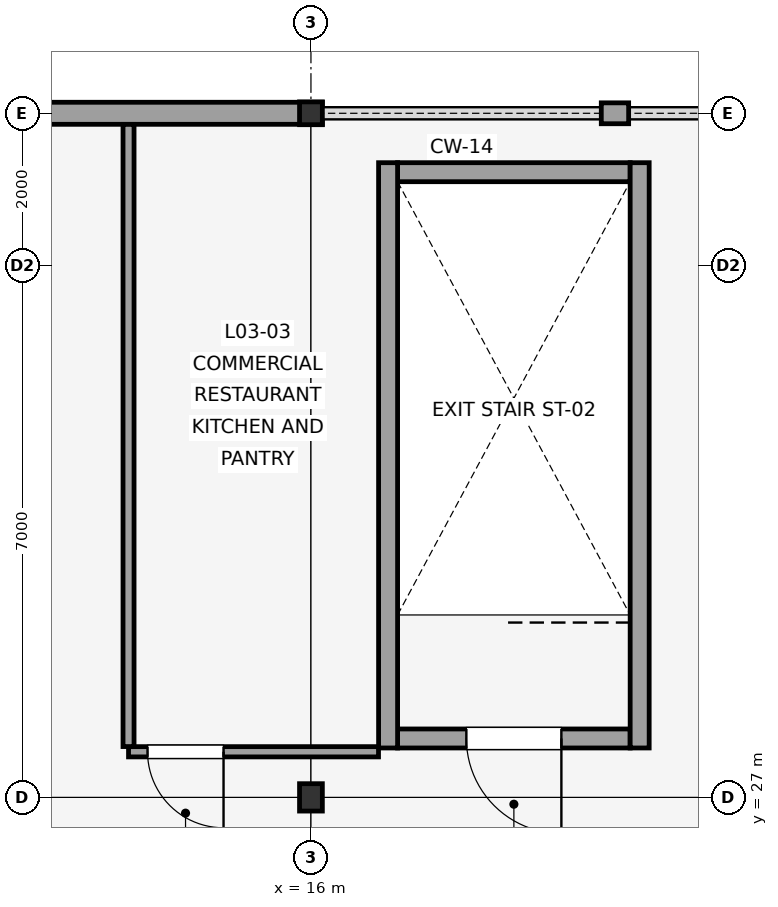
"""IFC4 building model, lengths in metres.
Left out: names, types, materials, properties, quantities, classifications, styles, units other than length and angle.
Written with IfcOpenShell. Run it as: python <this file> out.ifc"""

import sys

from ifc_helpers import new_model, si_unit, direction, frame, frame_2d, origin, origin_2d, place, context, subcontext, project, spatial, rectangle, i_section, extrude, element, fill, save


model = new_model("IFC4")
c1 = context("Model", 3, precision=1e-05, world=origin(), true_north=direction((0.0, 1.0)))
c2 = subcontext(c1, "Body", "Model", "MODEL_VIEW")
j1 = project(units=[si_unit("LENGTHUNIT", "METRE"), si_unit("PLANEANGLEUNIT", "RADIAN")], contexts=[c1])
p1 = place(None, origin())
s1 = spatial("IfcSite", under=j1, at=p1, CompositionType="ELEMENT")
p2 = place(p1, origin())
s2 = spatial("IfcBuilding", under=s1, at=p2, CompositionType="ELEMENT")
p3 = place(p2, frame((0.0, 0.0, 13.8)))
s3 = spatial("IfcBuildingStorey", under=s2, at=p3, CompositionType="ELEMENT", Elevation=13.8)
p4 = place(p3, frame((16.0, 27.0, 0.0), z_axis=(0.0, 0.0, 1.0), x_axis=(1.0, 0.0, 0.0)))
e1 = element("IfcColumn", 1, at=p4, inside=s3, PredefinedType="COLUMN", context=c2, shape_type="SweptSolid", body=[
    extrude(i_section(OverallWidth=0.3, OverallDepth=0.36, WebThickness=0.01, FlangeThickness=0.018, FilletRadius=0.027, at=origin_2d()), origin(), (0.0, 0.0, 1.0), 4.5),
])
p5 = place(p3, frame((16.0, 36.0, 0.0), z_axis=(0.0, 0.0, 1.0), x_axis=(1.0, 0.0, 0.0)))
e2 = element("IfcColumn", 2, at=p5, inside=s3, PredefinedType="COLUMN", context=c2, shape_type="SweptSolid", body=[
    extrude(i_section(OverallWidth=0.3, OverallDepth=0.3, WebThickness=0.009, FlangeThickness=0.014, FilletRadius=0.027, at=origin_2d()), origin(), (0.0, 0.0, 1.0), 4.5),
])
p6 = place(p3, frame((16.15, 36.0, 0.0), z_axis=(0.0, 0.0, 1.0), x_axis=(-1.0, 0.0, 0.0)))
e3 = element("IfcWall", 3, at=p6, inside=s3, PredefinedType="SOLIDWALL", context=c2, shape_type="SweptSolid", body=[
    extrude(rectangle(XDim=8.3, YDim=0.29, at=frame_2d((4.15, 0.0))), origin(), (0.0, 0.0, 1.0), 2.55),
])
p7 = place(p3, frame((20.18, 36.0, 0.0), z_axis=(0.0, 0.0, 1.0), x_axis=(-1.0, 0.0, 0.0)))
e4 = element("IfcWall", 4, at=p7, inside=s3, PredefinedType="SOLIDWALL", context=c2, shape_type="SweptSolid", body=[
    extrude(rectangle(XDim=0.36, YDim=0.275, at=frame_2d((0.18, 0.0))), origin(), (0.0, 0.0, 1.0), 2.55),
])
p8 = place(p3, frame((20.2, 27.775, 0.0), z_axis=(0.0, 0.0, 1.0), x_axis=(-1.0, 0.0, 0.0)))
e5 = element("IfcWall", 5, at=p8, inside=s3, PredefinedType="SHEAR", context=c2, shape_type="SweptSolid", body=[
    extrude(rectangle(XDim=3.06, YDim=0.25, at=frame_2d((1.53, 0.0))), origin(), (0.0, 0.0, 1.0), 4.5),
])
p9 = place(p8, frame((0.905, 0.0, 0.0)))
e6 = element("IfcOpeningElement", 6, at=p9, cuts=e5, PredefinedType="OPENING", context=c2, shape_type="SweptSolid", body=[
    extrude(rectangle(XDim=1.25, YDim=2.15, at=frame_2d((0.625, 1.075))), frame((0.0, 0.135, 0.0), z_axis=(0.0, -1.0, 0.0), x_axis=(1.0, 0.0, 0.0)), (0.0, 0.0, 1.0), 0.27),
])
p10 = place(p3, frame((20.2, 35.225, 0.0), z_axis=(0.0, 0.0, 1.0), x_axis=(-1.0, 0.0, 0.0)))
e7 = element("IfcWall", 7, at=p10, inside=s3, PredefinedType="SHEAR", context=c2, shape_type="SweptSolid", body=[
    extrude(rectangle(XDim=3.06, YDim=0.25, at=frame_2d((1.53, 0.0))), origin(), (0.0, 0.0, 1.0), 4.5),
])
for number, where, z_axis, x_axis in (
    (8, (20.325, 27.65, 0.0), (0.0, 0.0, 1.0), (0.0, 1.0, 0.0)),
    (9, (17.015, 27.65, 0.0), (0.0, 0.0, 1.0), (0.0, 1.0, 0.0)),
):
    element("IfcWall", number, at=place(p3, frame(where, z_axis=z_axis, x_axis=x_axis)), inside=s3, PredefinedType="SHEAR", context=c2, shape_type="SweptSolid", body=[
        extrude(rectangle(XDim=7.7, YDim=0.25, at=frame_2d((3.85, 0.0))), origin(), (0.0, 0.0, 1.0), 4.5),
    ])
p11 = place(p3, frame((16.889, 27.6, 0.0), z_axis=(0.0, 0.0, 1.0), x_axis=(-1.0, 0.0, 0.0)))
e10 = element("IfcWall", 10, at=p11, inside=s3, PredefinedType="PARTITIONING", context=c2, shape_type="SweptSolid", body=[
    extrude(rectangle(XDim=3.289, YDim=0.135, at=frame_2d((1.645, 0.0))), origin(), (0.0, 0.0, 1.0), 2.7),
])
p12 = place(p11, frame((2.039, 0.0, 0.0)))
e11 = element("IfcOpeningElement", 11, at=p12, cuts=e10, PredefinedType="OPENING", context=c2, shape_type="SweptSolid", body=[
    extrude(rectangle(XDim=1.0, YDim=2.15, at=frame_2d((0.5, 1.075))), frame((0.0, 0.077, 0.0), z_axis=(0.0, -1.0, 0.0), x_axis=(1.0, 0.0, 0.0)), (0.0, 0.0, 1.0), 0.155),
])
p13 = place(p3, frame((13.6, 27.668, 0.0), z_axis=(0.0, 0.0, 1.0), x_axis=(0.0, 1.0, 0.0)))
e12 = element("IfcWall", 12, at=p13, inside=s3, PredefinedType="PARTITIONING", context=c2, shape_type="SweptSolid", body=[
    extrude(rectangle(XDim=8.186, YDim=0.145, at=frame_2d((4.093, 0.0))), origin(), (0.0, 0.0, 1.0), 2.7),
])
p14 = place(p9, origin())
e13 = element("IfcDoor", 13, at=p14, inside=s3, OperationType="SINGLE_SWING_LEFT", PredefinedType="DOOR", context=c2, shape_type="SweptSolid", body=[
    extrude(rectangle(XDim=1.25, YDim=2.15, at=frame_2d((0.625, 1.075))), frame((0.0, 0.025, 0.0), z_axis=(0.0, -1.0, 0.0), x_axis=(1.0, 0.0, 0.0)), (0.0, 0.0, 1.0), 0.05),
])
fill(e6, e13)
p15 = place(p12, origin())
e14 = element("IfcDoor", 14, at=p15, inside=s3, OperationType="SINGLE_SWING_LEFT", PredefinedType="DOOR", context=c2, shape_type="SweptSolid", body=[
    extrude(rectangle(XDim=1.0, YDim=2.15, at=frame_2d((0.5, 1.075))), frame((0.0, 0.025, 0.0), z_axis=(0.0, -1.0, 0.0), x_axis=(1.0, 0.0, 0.0)), (0.0, 0.0, 1.0), 0.05),
])
fill(e11, e14)
save(model, sys.argv[1])
